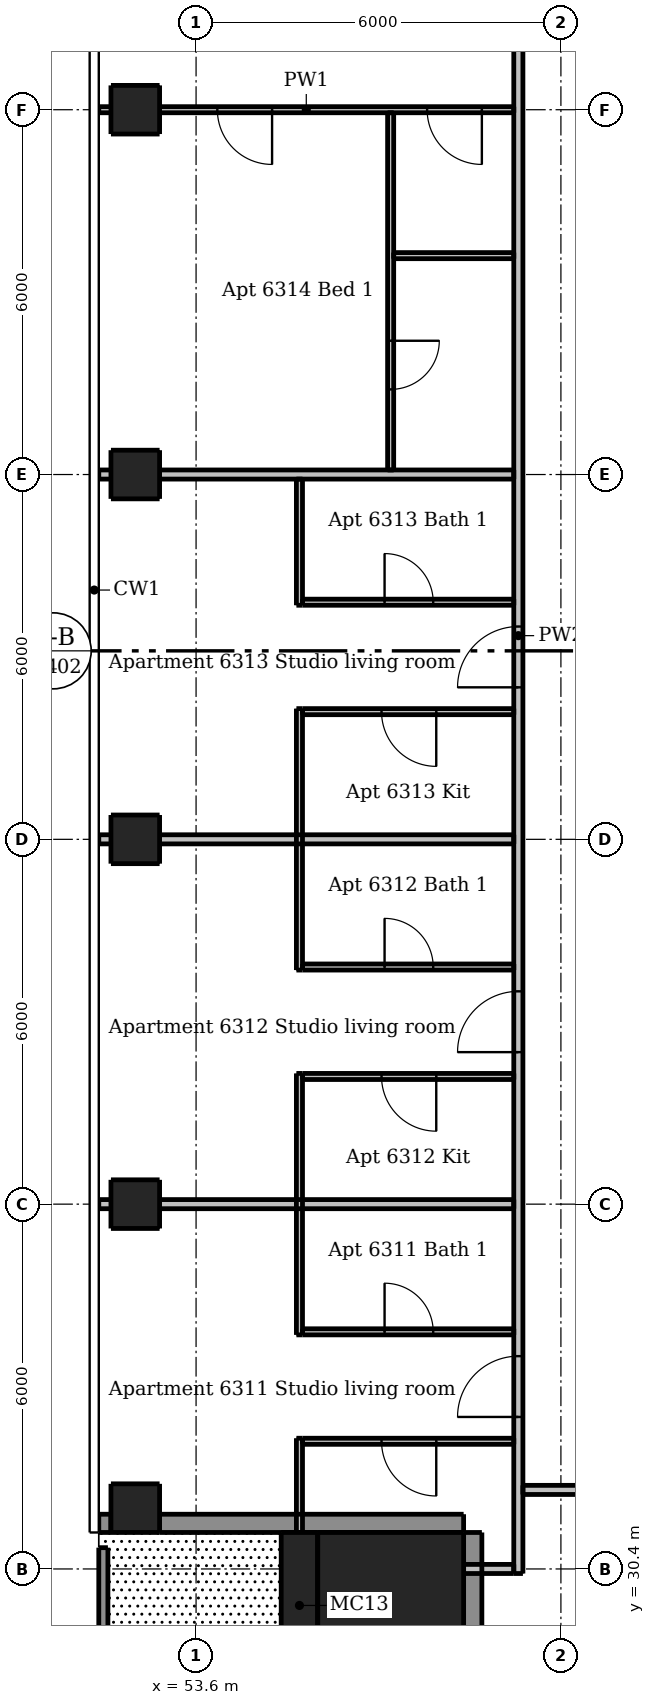
"""IFC4 building model, lengths in metres.
Left out: names, types, materials, properties, quantities, classifications, styles, units other than length and angle.
Written with IfcOpenShell. Run it as: python <this file> out.ifc"""

import sys

from ifc_helpers import new_model, si_unit, direction, frame, frame_2d, origin, origin_2d, place, context, subcontext, project, spatial, rectangle, extrude, element, fill, save


model = new_model("IFC4")
c1 = context("Model", 3, precision=1e-05, world=origin(), true_north=direction((0.0, 1.0)))
c2 = subcontext(c1, "Body", "Model", "MODEL_VIEW")
j1 = project(units=[si_unit("LENGTHUNIT", "METRE"), si_unit("PLANEANGLEUNIT", "RADIAN")], contexts=[c1])
p1 = place(None, origin())
s1 = spatial("IfcSite", under=j1, at=p1, CompositionType="ELEMENT")
p2 = place(p1, origin())
s2 = spatial("IfcBuilding", under=s1, at=p2, CompositionType="ELEMENT")
p3 = place(p2, frame((0.0, 0.0, 238.9)))
s3 = spatial("IfcBuildingStorey", under=s2, at=p3, CompositionType="ELEMENT", Elevation=238.9)
for number, where, z_axis, x_axis in (
    (1, (52.6, 31.4, 0.0), (0.0, 0.0, 1.0), (1.0, 0.0, 0.0)),
    (2, (52.6, 36.4, 0.0), (0.0, 0.0, 1.0), (1.0, 0.0, 0.0)),
    (3, (52.6, 42.4, 0.0), (0.0, 0.0, 1.0), (1.0, 0.0, 0.0)),
    (4, (52.6, 48.4, 0.0), (0.0, 0.0, 1.0), (1.0, 0.0, 0.0)),
    (5, (52.6, 54.4, 0.0), (0.0, 0.0, 1.0), (1.0, 0.0, 0.0)),
):
    element("IfcColumn", number, at=place(p3, frame(where, z_axis=z_axis, x_axis=x_axis)), inside=s3, PredefinedType="COLUMN", context=c2, shape_type="SweptSolid", body=[
        extrude(rectangle(XDim=0.8, YDim=0.8, at=origin_2d()), origin(), (0.0, 0.0, 1.0), 3.05),
    ])
p4 = place(p3, frame((55.3, 29.8, 0.0), z_axis=(0.0, 0.0, 1.0), x_axis=(1.0, 0.0, 0.0)))
e6 = element("IfcColumn", 6, at=p4, inside=s3, PredefinedType="COLUMN", context=c2, shape_type="SweptSolid", body=[
    extrude(rectangle(XDim=0.6, YDim=2.4, at=origin_2d()), origin(), (0.0, 0.0, 1.0), 2.4),
])
p5 = place(p3, frame((56.8, 29.8, 0.0), z_axis=(0.0, 0.0, 1.0), x_axis=(1.0, 0.0, 0.0)))
e7 = element("IfcColumn", 7, at=p5, inside=s3, PredefinedType="COLUMN", context=c2, shape_type="SweptSolid", body=[
    extrude(rectangle(XDim=2.4, YDim=2.4, at=origin_2d()), origin(), (0.0, 0.0, 1.0), 3.3),
])
p6 = place(p3, frame((52.0, 31.15, 0.0), z_axis=(0.0, 0.0, 1.0), x_axis=(1.0, 0.0, 0.0)))
e8 = element("IfcWall", 8, at=p6, inside=s3, PredefinedType="SOLIDWALL", context=c2, shape_type="SweptSolid", body=[
    extrude(rectangle(XDim=0.2, YDim=0.3, at=frame_2d((0.1, 0.0))), origin(), (0.0, 0.0, 1.0), 3.05),
])
p7 = place(p3, frame((53.0, 31.15, 0.0), z_axis=(0.0, 0.0, 1.0), x_axis=(1.0, 0.0, 0.0)))
e9 = element("IfcWall", 9, at=p7, inside=s3, PredefinedType="SOLIDWALL", context=c2, shape_type="SweptSolid", body=[
    extrude(rectangle(XDim=5.0, YDim=0.3, at=frame_2d((2.5, 0.0))), origin(), (0.0, 0.0, 1.0), 3.05),
])
p8 = place(p3, frame((58.15, 31.0, 0.0), z_axis=(0.0, 0.0, 1.0), x_axis=(0.0, -1.0, 0.0)))
e10 = element("IfcWall", 10, at=p8, inside=s3, PredefinedType="SOLIDWALL", context=c2, shape_type="SweptSolid", body=[
    extrude(rectangle(XDim=6.0, YDim=0.3, at=frame_2d((3.0, 0.0))), origin(), (0.0, 0.0, 1.0), 3.05),
])
p9 = place(p8, frame((1.8, 0.0, 0.15)))
e11 = element("IfcOpeningElement", 11, at=p9, cuts=e10, PredefinedType="OPENING", context=c2, shape_type="SweptSolid", body=[
    extrude(rectangle(XDim=2.4, YDim=2.1, at=frame_2d((1.2, 1.05))), frame((0.0, 0.16, 0.0), z_axis=(0.0, -1.0, 0.0), x_axis=(1.0, 0.0, 0.0)), (0.0, 0.0, 1.0), 0.32),
])
p10 = place(p3, frame((52.075, 30.75, 0.0), z_axis=(0.0, 0.0, 1.0), x_axis=(0.0, -1.0, 0.0)))
e12 = element("IfcWall", 12, at=p10, inside=s3, PredefinedType="PARAPET", context=c2, shape_type="SweptSolid", body=[
    extrude(rectangle(XDim=2.55, YDim=0.15, at=frame_2d((1.275, 0.0))), origin(), (0.0, 0.0, 1.0), 1.1),
])
p11 = place(p3, frame((55.3, 31.0, 0.0), z_axis=(0.0, 0.0, 1.0), x_axis=(0.0, 1.0, 0.0)))
e13 = element("IfcWall", 13, at=p11, inside=s3, PredefinedType="PARTITIONING", context=c2, shape_type="SweptSolid", body=[
    extrude(rectangle(XDim=1.55, YDim=0.1, at=frame_2d((0.775, 0.0))), origin(), (0.0, 0.0, 1.0), 3.05),
])
for number, where, z_axis, x_axis in (
    (14, (55.3, 34.25, 0.0), (0.0, 0.0, 1.0), (0.0, 1.0, 0.0)),
    (15, (55.3, 40.25, 0.0), (0.0, 0.0, 1.0), (0.0, 1.0, 0.0)),
):
    element("IfcWall", number, at=place(p3, frame(where, z_axis=z_axis, x_axis=x_axis)), inside=s3, PredefinedType="PARTITIONING", context=c2, shape_type="SweptSolid", body=[
        extrude(rectangle(XDim=4.3, YDim=0.1, at=frame_2d((2.15, 0.0))), origin(), (0.0, 0.0, 1.0), 3.05),
    ])
p12 = place(p3, frame((55.3, 46.25, 0.0), z_axis=(0.0, 0.0, 1.0), x_axis=(0.0, 1.0, 0.0)))
e16 = element("IfcWall", 16, at=p12, inside=s3, PredefinedType="PARTITIONING", context=c2, shape_type="SweptSolid", body=[
    extrude(rectangle(XDim=2.075, YDim=0.1, at=frame_2d((1.038, 0.0))), origin(), (0.0, 0.0, 1.0), 3.05),
])
p13 = place(p3, frame((56.8, 54.35, 0.0), z_axis=(0.0, 0.0, 1.0), x_axis=(0.0, -1.0, 0.0)))
e17 = element("IfcWall", 17, at=p13, inside=s3, PredefinedType="PARTITIONING", context=c2, shape_type="SweptSolid", body=[
    extrude(rectangle(XDim=5.875, YDim=0.1, at=frame_2d((2.938, 0.0))), origin(), (0.0, 0.0, 1.0), 3.05),
])
p14 = place(p13, frame((3.75, 0.0, 0.0)))
e18 = element("IfcOpeningElement", 18, at=p14, cuts=e17, PredefinedType="OPENING", context=c2, shape_type="SweptSolid", body=[
    extrude(rectangle(XDim=0.8, YDim=2.1, at=frame_2d((0.4, 1.05))), frame((0.0, 0.06, 0.0), z_axis=(0.0, -1.0, 0.0), x_axis=(1.0, 0.0, 0.0)), (0.0, 0.0, 1.0), 0.12),
])
p15 = place(p3, frame((58.825, 54.4, 0.0), z_axis=(0.0, 0.0, 1.0), x_axis=(-1.0, 0.0, 0.0)))
e19 = element("IfcWall", 19, at=p15, inside=s3, PredefinedType="PARTITIONING", context=c2, shape_type="SweptSolid", body=[
    extrude(rectangle(XDim=6.825, YDim=0.1, at=frame_2d((3.413, 0.0))), origin(), (0.0, 0.0, 1.0), 2.516),
])
p16 = place(p15, frame((0.525, 0.0, 0.0)))
e20 = element("IfcOpeningElement", 20, at=p16, cuts=e19, PredefinedType="OPENING", context=c2, shape_type="SweptSolid", body=[
    extrude(rectangle(XDim=0.9, YDim=2.1, at=frame_2d((0.45, 1.05))), frame((0.0, 0.06, 0.0), z_axis=(0.0, -1.0, 0.0), x_axis=(1.0, 0.0, 0.0)), (0.0, 0.0, 1.0), 0.12),
])
p17 = place(p15, frame((3.975, 0.0, 0.0)))
e21 = element("IfcOpeningElement", 21, at=p17, cuts=e19, PredefinedType="OPENING", context=c2, shape_type="SweptSolid", body=[
    extrude(rectangle(XDim=0.9, YDim=2.1, at=frame_2d((0.45, 1.05))), frame((0.0, 0.06, 0.0), z_axis=(0.0, -1.0, 0.0), x_axis=(1.0, 0.0, 0.0)), (0.0, 0.0, 1.0), 0.12),
])
p18 = place(p3, frame((56.85, 52.0, 0.0), z_axis=(0.0, 0.0, 1.0), x_axis=(1.0, 0.0, 0.0)))
e22 = element("IfcWall", 22, at=p18, inside=s3, PredefinedType="PARTITIONING", context=c2, shape_type="SweptSolid", body=[
    extrude(rectangle(XDim=1.975, YDim=0.1, at=frame_2d((0.987, 0.0))), origin(), (0.0, 0.0, 1.0), 3.05),
])
p19 = place(p3, frame((55.35, 46.3, 0.0), z_axis=(0.0, 0.0, 1.0), x_axis=(1.0, 0.0, 0.0)))
e23 = element("IfcWall", 23, at=p19, inside=s3, PredefinedType="PARTITIONING", context=c2, shape_type="SweptSolid", body=[
    extrude(rectangle(XDim=3.475, YDim=0.1, at=frame_2d((1.737, 0.0))), origin(), (0.0, 0.0, 1.0), 3.05),
])
p20 = place(p19, frame((1.35, 0.0, 0.0)))
e24 = element("IfcOpeningElement", 24, at=p20, cuts=e23, PredefinedType="OPENING", context=c2, shape_type="SweptSolid", body=[
    extrude(rectangle(XDim=0.8, YDim=2.1, at=frame_2d((0.4, 1.05))), frame((0.0, 0.06, 0.0), z_axis=(0.0, -1.0, 0.0), x_axis=(1.0, 0.0, 0.0)), (0.0, 0.0, 1.0), 0.12),
])
p21 = place(p3, frame((58.825, 44.5, 0.0), z_axis=(0.0, 0.0, 1.0), x_axis=(-1.0, 0.0, 0.0)))
e25 = element("IfcWall", 25, at=p21, inside=s3, PredefinedType="PARTITIONING", context=c2, shape_type="SweptSolid", body=[
    extrude(rectangle(XDim=3.475, YDim=0.1, at=frame_2d((1.737, 0.0))), origin(), (0.0, 0.0, 1.0), 3.05),
])
p22 = place(p21, frame((1.275, 0.0, 0.0)))
e26 = element("IfcOpeningElement", 26, at=p22, cuts=e25, PredefinedType="OPENING", context=c2, shape_type="SweptSolid", body=[
    extrude(rectangle(XDim=0.9, YDim=2.1, at=frame_2d((0.45, 1.05))), frame((0.0, 0.06, 0.0), z_axis=(0.0, -1.0, 0.0), x_axis=(1.0, 0.0, 0.0)), (0.0, 0.0, 1.0), 0.12),
])
p23 = place(p3, frame((55.35, 40.3, 0.0), z_axis=(0.0, 0.0, 1.0), x_axis=(1.0, 0.0, 0.0)))
e27 = element("IfcWall", 27, at=p23, inside=s3, PredefinedType="PARTITIONING", context=c2, shape_type="SweptSolid", body=[
    extrude(rectangle(XDim=3.475, YDim=0.1, at=frame_2d((1.737, 0.0))), origin(), (0.0, 0.0, 1.0), 3.05),
])
p24 = place(p23, frame((1.35, 0.0, 0.0)))
e28 = element("IfcOpeningElement", 28, at=p24, cuts=e27, PredefinedType="OPENING", context=c2, shape_type="SweptSolid", body=[
    extrude(rectangle(XDim=0.8, YDim=2.1, at=frame_2d((0.4, 1.05))), frame((0.0, 0.06, 0.0), z_axis=(0.0, -1.0, 0.0), x_axis=(1.0, 0.0, 0.0)), (0.0, 0.0, 1.0), 0.12),
])
p25 = place(p3, frame((58.825, 38.5, 0.0), z_axis=(0.0, 0.0, 1.0), x_axis=(-1.0, 0.0, 0.0)))
e29 = element("IfcWall", 29, at=p25, inside=s3, PredefinedType="PARTITIONING", context=c2, shape_type="SweptSolid", body=[
    extrude(rectangle(XDim=3.475, YDim=0.1, at=frame_2d((1.737, 0.0))), origin(), (0.0, 0.0, 1.0), 3.05),
])
p26 = place(p25, frame((1.275, 0.0, 0.0)))
e30 = element("IfcOpeningElement", 30, at=p26, cuts=e29, PredefinedType="OPENING", context=c2, shape_type="SweptSolid", body=[
    extrude(rectangle(XDim=0.9, YDim=2.1, at=frame_2d((0.45, 1.05))), frame((0.0, 0.06, 0.0), z_axis=(0.0, -1.0, 0.0), x_axis=(1.0, 0.0, 0.0)), (0.0, 0.0, 1.0), 0.12),
])
p27 = place(p3, frame((55.35, 34.3, 0.0), z_axis=(0.0, 0.0, 1.0), x_axis=(1.0, 0.0, 0.0)))
e31 = element("IfcWall", 31, at=p27, inside=s3, PredefinedType="PARTITIONING", context=c2, shape_type="SweptSolid", body=[
    extrude(rectangle(XDim=3.475, YDim=0.1, at=frame_2d((1.737, 0.0))), origin(), (0.0, 0.0, 1.0), 3.05),
])
p28 = place(p27, frame((1.35, 0.0, 0.0)))
e32 = element("IfcOpeningElement", 32, at=p28, cuts=e31, PredefinedType="OPENING", context=c2, shape_type="SweptSolid", body=[
    extrude(rectangle(XDim=0.8, YDim=2.1, at=frame_2d((0.4, 1.05))), frame((0.0, 0.06, 0.0), z_axis=(0.0, -1.0, 0.0), x_axis=(1.0, 0.0, 0.0)), (0.0, 0.0, 1.0), 0.12),
])
p29 = place(p3, frame((58.825, 32.5, 0.0), z_axis=(0.0, 0.0, 1.0), x_axis=(-1.0, 0.0, 0.0)))
e33 = element("IfcWall", 33, at=p29, inside=s3, PredefinedType="PARTITIONING", context=c2, shape_type="SweptSolid", body=[
    extrude(rectangle(XDim=3.475, YDim=0.1, at=frame_2d((1.737, 0.0))), origin(), (0.0, 0.0, 1.0), 3.05),
])
p30 = place(p29, frame((1.275, 0.0, 0.0)))
e34 = element("IfcOpeningElement", 34, at=p30, cuts=e33, PredefinedType="OPENING", context=c2, shape_type="SweptSolid", body=[
    extrude(rectangle(XDim=0.9, YDim=2.1, at=frame_2d((0.45, 1.05))), frame((0.0, 0.06, 0.0), z_axis=(0.0, -1.0, 0.0), x_axis=(1.0, 0.0, 0.0)), (0.0, 0.0, 1.0), 0.12),
])
p31 = place(p3, frame((58.9, 30.325, 0.0), z_axis=(0.0, 0.0, 1.0), x_axis=(0.0, 1.0, 0.0)))
e35 = element("IfcWall", 35, at=p31, inside=s3, PredefinedType="PARTITIONING", context=c2, shape_type="SweptSolid", body=[
    extrude(rectangle(XDim=30.85, YDim=0.15, at=frame_2d((15.425, 0.0))), origin(), (0.0, 0.0, 1.0), 3.05),
])
p32 = place(p31, frame((2.575, 0.0, 0.0)))
e36 = element("IfcOpeningElement", 36, at=p32, cuts=e35, PredefinedType="OPENING", context=c2, shape_type="SweptSolid", body=[
    extrude(rectangle(XDim=1.0, YDim=2.1, at=frame_2d((0.5, 1.05))), frame((0.0, 0.085, 0.0), z_axis=(0.0, -1.0, 0.0), x_axis=(1.0, 0.0, 0.0)), (0.0, 0.0, 1.0), 0.17),
])
p33 = place(p31, frame((8.575, 0.0, 0.0)))
e37 = element("IfcOpeningElement", 37, at=p33, cuts=e35, PredefinedType="OPENING", context=c2, shape_type="SweptSolid", body=[
    extrude(rectangle(XDim=1.0, YDim=2.1, at=frame_2d((0.5, 1.05))), frame((0.0, 0.085, 0.0), z_axis=(0.0, -1.0, 0.0), x_axis=(1.0, 0.0, 0.0)), (0.0, 0.0, 1.0), 0.17),
])
p34 = place(p31, frame((14.575, 0.0, 0.0)))
e38 = element("IfcOpeningElement", 38, at=p34, cuts=e35, PredefinedType="OPENING", context=c2, shape_type="SweptSolid", body=[
    extrude(rectangle(XDim=1.0, YDim=2.1, at=frame_2d((0.5, 1.05))), frame((0.0, 0.085, 0.0), z_axis=(0.0, -1.0, 0.0), x_axis=(1.0, 0.0, 0.0)), (0.0, 0.0, 1.0), 0.17),
])
p35 = place(p31, frame((26.925, 0.0, 0.0)))
e39 = element("IfcOpeningElement", 39, at=p35, cuts=e35, PredefinedType="OPENING", context=c2, shape_type="SweptSolid", body=[
    extrude(rectangle(XDim=1.0, YDim=2.1, at=frame_2d((0.5, 1.05))), frame((0.0, 0.085, 0.0), z_axis=(0.0, -1.0, 0.0), x_axis=(1.0, 0.0, 0.0)), (0.0, 0.0, 1.0), 0.17),
])
for number, where, z_axis, x_axis in (
    (40, (52.0, 48.4, 0.0), (0.0, 0.0, 1.0), (1.0, 0.0, 0.0)),
    (41, (52.0, 42.4, 0.0), (0.0, 0.0, 1.0), (1.0, 0.0, 0.0)),
    (42, (52.0, 36.4, 0.0), (0.0, 0.0, 1.0), (1.0, 0.0, 0.0)),
):
    element("IfcWall", number, at=place(p3, frame(where, z_axis=z_axis, x_axis=x_axis)), inside=s3, PredefinedType="PARTITIONING", context=c2, shape_type="SweptSolid", body=[
        extrude(rectangle(XDim=6.825, YDim=0.15, at=frame_2d((3.413, 0.0))), origin(), (0.0, 0.0, 1.0), 2.516),
    ])
p36 = place(p3, frame((89.525, 31.7, 0.0), z_axis=(0.0, 0.0, 1.0), x_axis=(-1.0, 0.0, 0.0)))
e43 = element("IfcWall", 43, at=p36, inside=s3, PredefinedType="PARTITIONING", context=c2, shape_type="SweptSolid", body=[
    extrude(rectangle(XDim=30.55, YDim=0.15, at=frame_2d((15.275, 0.0))), origin(), (0.0, 0.0, 1.0), 3.05),
])
p37 = place(p36, frame((26.775, 0.0, 0.0)))
e44 = element("IfcOpeningElement", 44, at=p37, cuts=e43, PredefinedType="OPENING", context=c2, shape_type="SweptSolid", body=[
    extrude(rectangle(XDim=1.0, YDim=2.1, at=frame_2d((0.5, 1.05))), frame((0.0, 0.085, 0.0), z_axis=(0.0, -1.0, 0.0), x_axis=(1.0, 0.0, 0.0)), (0.0, 0.0, 1.0), 0.17),
])
p38 = place(p36, frame((14.425, 0.0, 0.0)))
e45 = element("IfcOpeningElement", 45, at=p38, cuts=e43, PredefinedType="OPENING", context=c2, shape_type="SweptSolid", body=[
    extrude(rectangle(XDim=1.0, YDim=2.1, at=frame_2d((0.5, 1.05))), frame((0.0, 0.085, 0.0), z_axis=(0.0, -1.0, 0.0), x_axis=(1.0, 0.0, 0.0)), (0.0, 0.0, 1.0), 0.17),
])
p39 = place(p36, frame((6.962, 0.0, 0.0)))
e46 = element("IfcOpeningElement", 46, at=p39, cuts=e43, PredefinedType="OPENING", context=c2, shape_type="SweptSolid", body=[
    extrude(rectangle(XDim=1.0, YDim=2.1, at=frame_2d((0.5, 1.05))), frame((0.0, 0.085, 0.0), z_axis=(0.0, -1.0, 0.0), x_axis=(1.0, 0.0, 0.0)), (0.0, 0.0, 1.0), 0.17),
])
p40 = place(p3, frame((58.0, 30.4, 0.0), z_axis=(0.0, 0.0, 1.0), x_axis=(1.0, 0.0, 0.0)))
e47 = element("IfcWall", 47, at=p40, inside=s3, PredefinedType="PARTITIONING", context=c2, shape_type="SweptSolid", body=[
    extrude(rectangle(XDim=0.825, YDim=0.15, at=frame_2d((0.413, 0.0))), origin(), (0.0, 0.0, 1.0), 3.05),
])
p41 = place(p32, origin())
e48 = element("IfcDoor", 48, at=p41, inside=s3, OperationType="SINGLE_SWING_LEFT", PredefinedType="DOOR", context=c2, shape_type="SweptSolid", body=[
    extrude(rectangle(XDim=1.0, YDim=2.1, at=frame_2d((0.5, 1.05))), frame((0.0, 0.025, 0.0), z_axis=(0.0, -1.0, 0.0), x_axis=(1.0, 0.0, 0.0)), (0.0, 0.0, 1.0), 0.05),
])
fill(e36, e48)
p42 = place(p30, origin())
e49 = element("IfcDoor", 49, at=p42, inside=s3, OperationType="SINGLE_SWING_LEFT", PredefinedType="DOOR", context=c2, shape_type="SweptSolid", body=[
    extrude(rectangle(XDim=0.9, YDim=2.1, at=frame_2d((0.45, 1.05))), frame((0.0, 0.025, 0.0), z_axis=(0.0, -1.0, 0.0), x_axis=(1.0, 0.0, 0.0)), (0.0, 0.0, 1.0), 0.05),
])
fill(e34, e49)
p43 = place(p28, origin())
e50 = element("IfcDoor", 50, at=p43, inside=s3, OperationType="SINGLE_SWING_LEFT", PredefinedType="DOOR", context=c2, shape_type="SweptSolid", body=[
    extrude(rectangle(XDim=0.8, YDim=2.1, at=frame_2d((0.4, 1.05))), frame((0.0, 0.025, 0.0), z_axis=(0.0, -1.0, 0.0), x_axis=(1.0, 0.0, 0.0)), (0.0, 0.0, 1.0), 0.05),
])
fill(e32, e50)
p44 = place(p33, origin())
e51 = element("IfcDoor", 51, at=p44, inside=s3, OperationType="SINGLE_SWING_LEFT", PredefinedType="DOOR", context=c2, shape_type="SweptSolid", body=[
    extrude(rectangle(XDim=1.0, YDim=2.1, at=frame_2d((0.5, 1.05))), frame((0.0, 0.025, 0.0), z_axis=(0.0, -1.0, 0.0), x_axis=(1.0, 0.0, 0.0)), (0.0, 0.0, 1.0), 0.05),
])
fill(e37, e51)
p45 = place(p26, origin())
e52 = element("IfcDoor", 52, at=p45, inside=s3, OperationType="SINGLE_SWING_LEFT", PredefinedType="DOOR", context=c2, shape_type="SweptSolid", body=[
    extrude(rectangle(XDim=0.9, YDim=2.1, at=frame_2d((0.45, 1.05))), frame((0.0, 0.025, 0.0), z_axis=(0.0, -1.0, 0.0), x_axis=(1.0, 0.0, 0.0)), (0.0, 0.0, 1.0), 0.05),
])
fill(e30, e52)
p46 = place(p24, origin())
e53 = element("IfcDoor", 53, at=p46, inside=s3, OperationType="SINGLE_SWING_LEFT", PredefinedType="DOOR", context=c2, shape_type="SweptSolid", body=[
    extrude(rectangle(XDim=0.8, YDim=2.1, at=frame_2d((0.4, 1.05))), frame((0.0, 0.025, 0.0), z_axis=(0.0, -1.0, 0.0), x_axis=(1.0, 0.0, 0.0)), (0.0, 0.0, 1.0), 0.05),
])
fill(e28, e53)
p47 = place(p34, origin())
e54 = element("IfcDoor", 54, at=p47, inside=s3, OperationType="SINGLE_SWING_LEFT", PredefinedType="DOOR", context=c2, shape_type="SweptSolid", body=[
    extrude(rectangle(XDim=1.0, YDim=2.1, at=frame_2d((0.5, 1.05))), frame((0.0, 0.025, 0.0), z_axis=(0.0, -1.0, 0.0), x_axis=(1.0, 0.0, 0.0)), (0.0, 0.0, 1.0), 0.05),
])
fill(e38, e54)
p48 = place(p22, origin())
e55 = element("IfcDoor", 55, at=p48, inside=s3, OperationType="SINGLE_SWING_LEFT", PredefinedType="DOOR", context=c2, shape_type="SweptSolid", body=[
    extrude(rectangle(XDim=0.9, YDim=2.1, at=frame_2d((0.45, 1.05))), frame((0.0, 0.025, 0.0), z_axis=(0.0, -1.0, 0.0), x_axis=(1.0, 0.0, 0.0)), (0.0, 0.0, 1.0), 0.05),
])
fill(e26, e55)
p49 = place(p20, origin())
e56 = element("IfcDoor", 56, at=p49, inside=s3, OperationType="SINGLE_SWING_LEFT", PredefinedType="DOOR", context=c2, shape_type="SweptSolid", body=[
    extrude(rectangle(XDim=0.8, YDim=2.1, at=frame_2d((0.4, 1.05))), frame((0.0, 0.025, 0.0), z_axis=(0.0, -1.0, 0.0), x_axis=(1.0, 0.0, 0.0)), (0.0, 0.0, 1.0), 0.05),
])
fill(e24, e56)
p50 = place(p16, origin())
e57 = element("IfcDoor", 57, at=p50, inside=s3, OperationType="SINGLE_SWING_LEFT", PredefinedType="DOOR", context=c2, shape_type="SweptSolid", body=[
    extrude(rectangle(XDim=0.9, YDim=2.1, at=frame_2d((0.45, 1.05))), frame((0.0, 0.025, 0.0), z_axis=(0.0, -1.0, 0.0), x_axis=(1.0, 0.0, 0.0)), (0.0, 0.0, 1.0), 0.05),
])
fill(e20, e57)
p51 = place(p17, origin())
e58 = element("IfcDoor", 58, at=p51, inside=s3, OperationType="SINGLE_SWING_LEFT", PredefinedType="DOOR", context=c2, shape_type="SweptSolid", body=[
    extrude(rectangle(XDim=0.9, YDim=2.1, at=frame_2d((0.45, 1.05))), frame((0.0, 0.025, 0.0), z_axis=(0.0, -1.0, 0.0), x_axis=(1.0, 0.0, 0.0)), (0.0, 0.0, 1.0), 0.05),
])
fill(e21, e58)
p52 = place(p14, origin())
e59 = element("IfcDoor", 59, at=p52, inside=s3, OperationType="SINGLE_SWING_LEFT", PredefinedType="DOOR", context=c2, shape_type="SweptSolid", body=[
    extrude(rectangle(XDim=0.8, YDim=2.1, at=frame_2d((0.4, 1.05))), frame((0.0, 0.025, 0.0), z_axis=(0.0, -1.0, 0.0), x_axis=(1.0, 0.0, 0.0)), (0.0, 0.0, 1.0), 0.05),
])
fill(e18, e59)
save(model, sys.argv[1])
